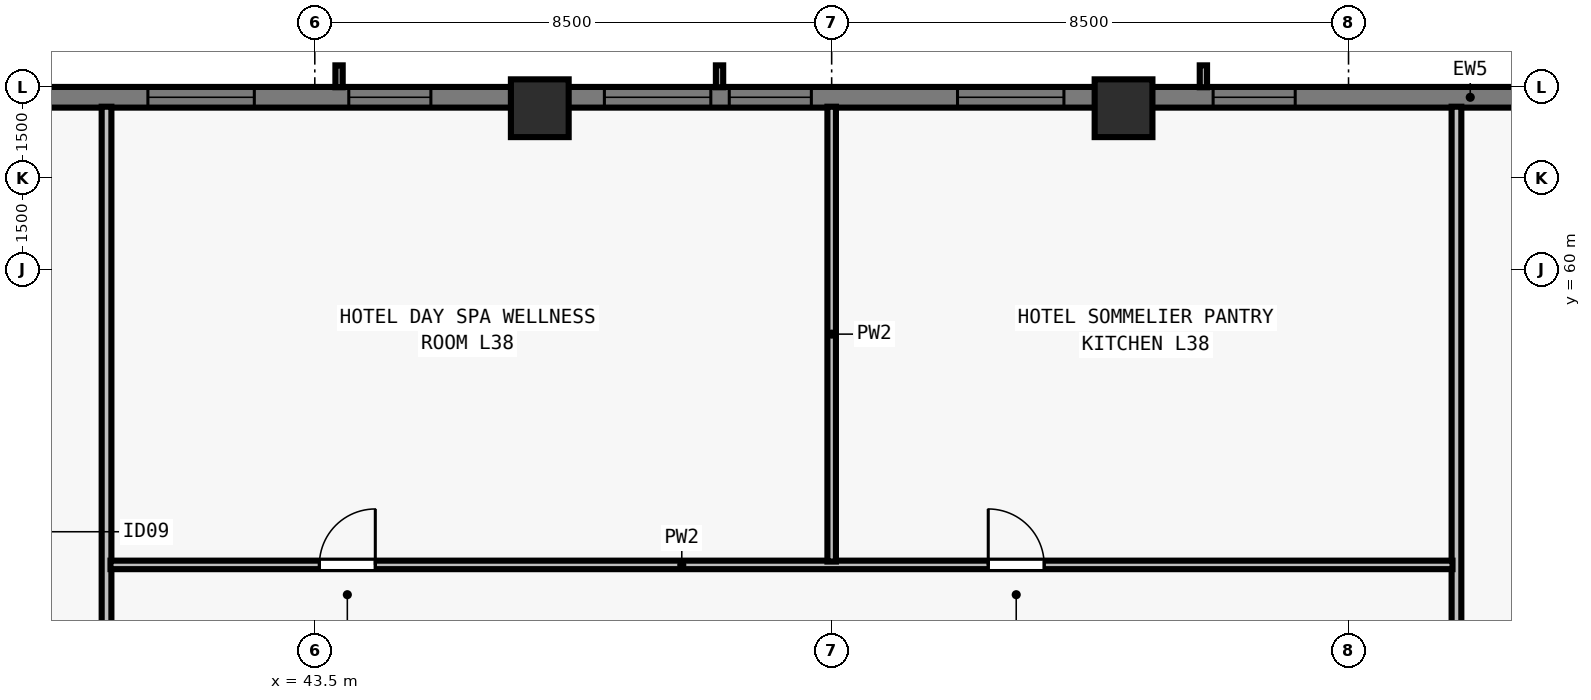
"""IFC4 building model, lengths in metres.
Left out: names, types, materials, properties, quantities, classifications, styles, units other than length and angle.
Written with IfcOpenShell. Run it as: python <this file> out.ifc"""

import sys

from ifc_helpers import new_model, si_unit, direction, frame, frame_2d, origin, origin_2d, place, context, subcontext, project, spatial, rectangle, extrude, element, fill, save


model = new_model("IFC4")
c1 = context("Model", 3, precision=1e-05, world=origin(), true_north=direction((0.0, 1.0)))
c2 = subcontext(c1, "Body", "Model", "MODEL_VIEW")
j1 = project(units=[si_unit("LENGTHUNIT", "METRE"), si_unit("PLANEANGLEUNIT", "RADIAN")], contexts=[c1])
p1 = place(None, origin())
s1 = spatial("IfcSite", under=j1, at=p1, CompositionType="ELEMENT")
p2 = place(p1, origin())
s2 = spatial("IfcBuilding", under=s1, at=p2, CompositionType="ELEMENT")
p3 = place(p2, frame((0.0, 0.0, 141.0)))
s3 = spatial("IfcBuildingStorey", under=s2, at=p3, CompositionType="ELEMENT", Elevation=141.0)
for number, where, z_axis, x_axis in (
    (1, (56.8, 62.65, 0.0), (0.0, 0.0, 1.0), (1.0, 0.0, 0.0)),
    (2, (47.2, 62.65, 0.0), (0.0, 0.0, 1.0), (1.0, 0.0, 0.0)),
):
    element("IfcColumn", number, at=place(p3, frame(where, z_axis=z_axis, x_axis=x_axis)), inside=s3, PredefinedType="COLUMN", context=c2, shape_type="SweptSolid", body=[
        extrude(rectangle(XDim=0.95, YDim=0.95, at=origin_2d()), origin(), (0.0, 0.0, 1.0), 3.5),
    ])
p4 = place(p3, frame((32.0, 62.83, 0.0), z_axis=(0.0, 0.0, 1.0), x_axis=(1.0, 0.0, 0.0)))
e3 = element("IfcWall", 3, at=p4, inside=s3, PredefinedType="SOLIDWALL", context=c2, shape_type="SweptSolid", body=[
    extrude(rectangle(XDim=39.682, YDim=0.34, at=frame_2d((19.841, 0.0))), origin(), (0.0, 0.0, 1.0), 3.28),
])
p5 = place(p4, frame((4.102, 0.0, 0.8)))
e4 = element("IfcOpeningElement", 4, at=p5, cuts=e3, PredefinedType="OPENING", context=c2, shape_type="SweptSolid", body=[
    extrude(rectangle(XDim=1.35, YDim=1.66, at=frame_2d((0.675, 0.83))), frame((0.0, 0.18, 0.0), z_axis=(0.0, -1.0, 0.0), x_axis=(1.0, 0.0, 0.0)), (0.0, 0.0, 1.0), 0.36),
])
p6 = place(p4, frame((8.755, 0.0, 0.8)))
e5 = element("IfcOpeningElement", 5, at=p6, cuts=e3, PredefinedType="OPENING", context=c2, shape_type="SweptSolid", body=[
    extrude(rectangle(XDim=1.75, YDim=1.66, at=frame_2d((0.875, 0.83))), frame((0.0, 0.18, 0.0), z_axis=(0.0, -1.0, 0.0), x_axis=(1.0, 0.0, 0.0)), (0.0, 0.0, 1.0), 0.36),
])
p7 = place(p4, frame((12.059, 0.0, 0.8)))
e6 = element("IfcOpeningElement", 6, at=p7, cuts=e3, PredefinedType="OPENING", context=c2, shape_type="SweptSolid", body=[
    extrude(rectangle(XDim=1.35, YDim=1.66, at=frame_2d((0.675, 0.83))), frame((0.0, 0.18, 0.0), z_axis=(0.0, -1.0, 0.0), x_axis=(1.0, 0.0, 0.0)), (0.0, 0.0, 1.0), 0.36),
])
p8 = place(p4, frame((16.262, 0.0, 0.8)))
e7 = element("IfcOpeningElement", 7, at=p8, cuts=e3, PredefinedType="OPENING", context=c2, shape_type="SweptSolid", body=[
    extrude(rectangle(XDim=1.75, YDim=1.66, at=frame_2d((0.875, 0.83))), frame((0.0, 0.18, 0.0), z_axis=(0.0, -1.0, 0.0), x_axis=(1.0, 0.0, 0.0)), (0.0, 0.0, 1.0), 0.36),
])
p9 = place(p4, frame((18.316, 0.0, 0.8)))
e8 = element("IfcOpeningElement", 8, at=p9, cuts=e3, PredefinedType="OPENING", context=c2, shape_type="SweptSolid", body=[
    extrude(rectangle(XDim=1.35, YDim=1.66, at=frame_2d((0.675, 0.83))), frame((0.0, 0.18, 0.0), z_axis=(0.0, -1.0, 0.0), x_axis=(1.0, 0.0, 0.0)), (0.0, 0.0, 1.0), 0.36),
])
p10 = place(p4, frame((22.07, 0.0, 0.8)))
e9 = element("IfcOpeningElement", 9, at=p10, cuts=e3, PredefinedType="OPENING", context=c2, shape_type="SweptSolid", body=[
    extrude(rectangle(XDim=1.75, YDim=1.66, at=frame_2d((0.875, 0.83))), frame((0.0, 0.18, 0.0), z_axis=(0.0, -1.0, 0.0), x_axis=(1.0, 0.0, 0.0)), (0.0, 0.0, 1.0), 0.36),
])
p11 = place(p4, frame((26.273, 0.0, 0.8)))
e10 = element("IfcOpeningElement", 10, at=p11, cuts=e3, PredefinedType="OPENING", context=c2, shape_type="SweptSolid", body=[
    extrude(rectangle(XDim=1.35, YDim=1.66, at=frame_2d((0.675, 0.83))), frame((0.0, 0.18, 0.0), z_axis=(0.0, -1.0, 0.0), x_axis=(1.0, 0.0, 0.0)), (0.0, 0.0, 1.0), 0.36),
])
p12 = place(p4, frame((33.38, 0.0, 0.8)))
e11 = element("IfcOpeningElement", 11, at=p12, cuts=e3, PredefinedType="OPENING", context=c2, shape_type="SweptSolid", body=[
    extrude(rectangle(XDim=1.35, YDim=1.66, at=frame_2d((0.675, 0.83))), frame((0.0, 0.18, 0.0), z_axis=(0.0, -1.0, 0.0), x_axis=(1.0, 0.0, 0.0)), (0.0, 0.0, 1.0), 0.36),
])
p13 = place(p3, frame((40.075, 47.6, 0.0), z_axis=(0.0, 0.0, 1.0), x_axis=(0.0, 1.0, 0.0)))
e12 = element("IfcWall", 12, at=p13, inside=s3, PredefinedType="PARTITIONING", context=c2, shape_type="SweptSolid", body=[
    extrude(rectangle(XDim=15.075, YDim=0.16, at=frame_2d((7.538, 0.0))), origin(), (0.0, 0.0, 1.0), 2.555),
])
p14 = place(p13, frame((1.8, 0.0, 0.0)))
e13 = element("IfcOpeningElement", 13, at=p14, cuts=e12, PredefinedType="OPENING", context=c2, shape_type="SweptSolid", body=[
    extrude(rectangle(XDim=0.96, YDim=2.12, at=frame_2d((0.48, 1.06))), frame((0.0, 0.09, 0.0), z_axis=(0.0, -1.0, 0.0), x_axis=(1.0, 0.0, 0.0)), (0.0, 0.0, 1.0), 0.18),
])
p15 = place(p3, frame((62.275, 47.6, 0.0), z_axis=(0.0, 0.0, 1.0), x_axis=(0.0, 1.0, 0.0)))
e14 = element("IfcWall", 14, at=p15, inside=s3, PredefinedType="PARTITIONING", context=c2, shape_type="SweptSolid", body=[
    extrude(rectangle(XDim=15.075, YDim=0.16, at=frame_2d((7.538, 0.0))), origin(), (0.0, 0.0, 1.0), 2.555),
])
p16 = place(p3, frame((40.14, 55.14, 0.0), z_axis=(0.0, 0.0, 1.0), x_axis=(1.0, 0.0, 0.0)))
e15 = element("IfcWall", 15, at=p16, inside=s3, PredefinedType="PARTITIONING", context=c2, shape_type="SweptSolid", body=[
    extrude(rectangle(XDim=22.07, YDim=0.14, at=frame_2d((11.035, 0.0))), origin(), (0.0, 0.0, 1.0), 3.28),
])
p17 = place(p16, frame((3.435, 0.0, 0.0)))
e16 = element("IfcOpeningElement", 16, at=p17, cuts=e15, PredefinedType="OPENING", context=c2, shape_type="SweptSolid", body=[
    extrude(rectangle(XDim=0.92, YDim=2.12, at=frame_2d((0.46, 1.06))), frame((0.0, 0.08, 0.0), z_axis=(0.0, -1.0, 0.0), x_axis=(1.0, 0.0, 0.0)), (0.0, 0.0, 1.0), 0.16),
])
p18 = place(p16, frame((14.435, 0.0, 0.0)))
e17 = element("IfcOpeningElement", 17, at=p18, cuts=e15, PredefinedType="OPENING", context=c2, shape_type="SweptSolid", body=[
    extrude(rectangle(XDim=0.92, YDim=2.12, at=frame_2d((0.46, 1.06))), frame((0.0, 0.08, 0.0), z_axis=(0.0, -1.0, 0.0), x_axis=(1.0, 0.0, 0.0)), (0.0, 0.0, 1.0), 0.16),
])
p19 = place(p3, frame((52.0, 55.195, 0.0), z_axis=(0.0, 0.0, 1.0), x_axis=(0.0, 1.0, 0.0)))
e18 = element("IfcWall", 18, at=p19, inside=s3, PredefinedType="PARTITIONING", context=c2, shape_type="SweptSolid", body=[
    extrude(rectangle(XDim=7.48, YDim=0.14, at=frame_2d((3.74, 0.0))), origin(), (0.0, 0.0, 1.0), 3.28),
])
p20 = place(p6, origin())
e19 = element("IfcWindow", 19, at=p20, inside=s3, PartitioningType="SINGLE_PANEL", PredefinedType="WINDOW", context=c2, shape_type="SweptSolid", body=[
    extrude(rectangle(XDim=1.75, YDim=1.66, at=frame_2d((0.875, 0.83))), frame((0.0, -0.05, 0.0), z_axis=(0.0, -1.0, 0.0), x_axis=(1.0, 0.0, 0.0)), (0.0, 0.0, 1.0), 0.06),
])
fill(e5, e19)
p21 = place(p7, origin())
e20 = element("IfcWindow", 20, at=p21, inside=s3, PartitioningType="SINGLE_PANEL", PredefinedType="WINDOW", context=c2, shape_type="SweptSolid", body=[
    extrude(rectangle(XDim=1.35, YDim=1.66, at=frame_2d((0.675, 0.83))), frame((0.0, -0.05, 0.0), z_axis=(0.0, -1.0, 0.0), x_axis=(1.0, 0.0, 0.0)), (0.0, 0.0, 1.0), 0.06),
])
fill(e6, e20)
p22 = place(p8, origin())
e21 = element("IfcWindow", 21, at=p22, inside=s3, PartitioningType="SINGLE_PANEL", PredefinedType="WINDOW", context=c2, shape_type="SweptSolid", body=[
    extrude(rectangle(XDim=1.75, YDim=1.66, at=frame_2d((0.875, 0.83))), frame((0.0, -0.05, 0.0), z_axis=(0.0, -1.0, 0.0), x_axis=(1.0, 0.0, 0.0)), (0.0, 0.0, 1.0), 0.06),
])
fill(e7, e21)
p23 = place(p9, origin())
e22 = element("IfcWindow", 22, at=p23, inside=s3, PartitioningType="SINGLE_PANEL", PredefinedType="WINDOW", context=c2, shape_type="SweptSolid", body=[
    extrude(rectangle(XDim=1.35, YDim=1.66, at=frame_2d((0.675, 0.83))), frame((0.0, -0.05, 0.0), z_axis=(0.0, -1.0, 0.0), x_axis=(1.0, 0.0, 0.0)), (0.0, 0.0, 1.0), 0.06),
])
fill(e8, e22)
p24 = place(p10, origin())
e23 = element("IfcWindow", 23, at=p24, inside=s3, PartitioningType="SINGLE_PANEL", PredefinedType="WINDOW", context=c2, shape_type="SweptSolid", body=[
    extrude(rectangle(XDim=1.75, YDim=1.66, at=frame_2d((0.875, 0.83))), frame((0.0, -0.05, 0.0), z_axis=(0.0, -1.0, 0.0), x_axis=(1.0, 0.0, 0.0)), (0.0, 0.0, 1.0), 0.06),
])
fill(e9, e23)
p25 = place(p11, origin())
e24 = element("IfcWindow", 24, at=p25, inside=s3, PartitioningType="SINGLE_PANEL", PredefinedType="WINDOW", context=c2, shape_type="SweptSolid", body=[
    extrude(rectangle(XDim=1.35, YDim=1.66, at=frame_2d((0.675, 0.83))), frame((0.0, -0.05, 0.0), z_axis=(0.0, -1.0, 0.0), x_axis=(1.0, 0.0, 0.0)), (0.0, 0.0, 1.0), 0.06),
])
fill(e10, e24)
p26 = place(p17, origin())
e25 = element("IfcDoor", 25, at=p26, inside=s3, OperationType="SINGLE_SWING_RIGHT", PredefinedType="DOOR", context=c2, shape_type="SweptSolid", body=[
    extrude(rectangle(XDim=0.92, YDim=2.12, at=frame_2d((0.46, 1.06))), frame((0.0, 0.025, 0.0), z_axis=(0.0, -1.0, 0.0), x_axis=(1.0, 0.0, 0.0)), (0.0, 0.0, 1.0), 0.05),
])
fill(e16, e25)
p27 = place(p18, origin())
e26 = element("IfcDoor", 26, at=p27, inside=s3, OperationType="SINGLE_SWING_LEFT", PredefinedType="DOOR", context=c2, shape_type="SweptSolid", body=[
    extrude(rectangle(XDim=0.92, YDim=2.12, at=frame_2d((0.46, 1.06))), frame((0.0, 0.025, 0.0), z_axis=(0.0, -1.0, 0.0), x_axis=(1.0, 0.0, 0.0)), (0.0, 0.0, 1.0), 0.05),
])
fill(e17, e26)
save(model, sys.argv[1])
